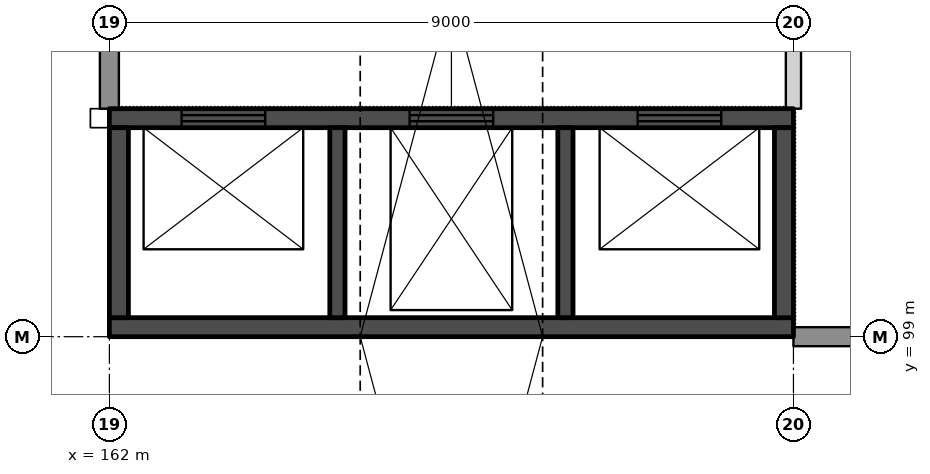
"""IFC4 building model, lengths in metres.
Left out: names, types, materials, properties, quantities, classifications, styles, units other than length and angle.
Written with IfcOpenShell. Run it as: python <this file> out.ifc"""

import sys

from ifc_helpers import new_model, si_unit, direction, frame, frame_2d, origin, place, context, subcontext, project, spatial, polyline, rectangle, outline, extrude, element, fill, save


model = new_model("IFC4")
c1 = context("Model", 3, precision=1e-05, world=origin(), true_north=direction((0.0, 1.0)))
c2 = subcontext(c1, "Body", "Model", "MODEL_VIEW")
j1 = project(units=[si_unit("LENGTHUNIT", "METRE"), si_unit("PLANEANGLEUNIT", "RADIAN")], contexts=[c1])
p1 = place(None, origin())
s1 = spatial("IfcSite", under=j1, at=p1, CompositionType="ELEMENT")
p2 = place(p1, origin())
s2 = spatial("IfcBuilding", under=s1, at=p2, CompositionType="ELEMENT")
p3 = place(p2, frame((0.0, 0.0, 33.5)))
s3 = spatial("IfcBuildingStorey", under=s2, at=p3, CompositionType="ELEMENT", Elevation=33.5)
p4 = place(p3, frame((171.0, 102.0, 0.0), z_axis=(0.0, 0.0, 1.0), x_axis=(0.0, 1.0, 0.0)))
e1 = element("IfcWall", 1, at=p4, inside=s3, PredefinedType="PARTITIONING", context=c2, shape_type="SweptSolid", body=[
    extrude(rectangle(XDim=5.65, YDim=0.2, at=frame_2d((2.825, 0.0))), origin(), (0.0, 0.0, 1.0), 4.0),
])
p5 = place(p3, frame((162.0, 101.875, 0.0), z_axis=(0.0, 0.0, 1.0), x_axis=(1.0, 0.0, 0.0)))
e2 = element("IfcWall", 2, at=p5, inside=s3, PredefinedType="SHEAR", context=c2, shape_type="SweptSolid", body=[
    extrude(rectangle(XDim=9.0, YDim=0.25, at=frame_2d((4.5, 0.0))), origin(), (0.0, 0.0, 1.0), 4.0),
])
p6 = place(p5, frame((0.95, 0.0, 0.0)))
e3 = element("IfcOpeningElement", 3, at=p6, cuts=e2, PredefinedType="OPENING", context=c2, shape_type="SweptSolid", body=[
    extrude(rectangle(XDim=1.1, YDim=2.1, at=frame_2d((0.55, 1.05))), frame((0.0, 0.135, 0.0), z_axis=(0.0, -1.0, 0.0), x_axis=(1.0, 0.0, 0.0)), (0.0, 0.0, 1.0), 0.27),
])
p7 = place(p5, frame((3.95, 0.0, 0.0)))
e4 = element("IfcOpeningElement", 4, at=p7, cuts=e2, PredefinedType="OPENING", context=c2, shape_type="SweptSolid", body=[
    extrude(rectangle(XDim=1.1, YDim=2.1, at=frame_2d((0.55, 1.05))), frame((0.0, 0.135, 0.0), z_axis=(0.0, -1.0, 0.0), x_axis=(1.0, 0.0, 0.0)), (0.0, 0.0, 1.0), 0.27),
])
p8 = place(p5, frame((6.95, 0.0, 0.0)))
e5 = element("IfcOpeningElement", 5, at=p8, cuts=e2, PredefinedType="OPENING", context=c2, shape_type="SweptSolid", body=[
    extrude(rectangle(XDim=1.1, YDim=2.1, at=frame_2d((0.55, 1.05))), frame((0.0, 0.135, 0.0), z_axis=(0.0, -1.0, 0.0), x_axis=(1.0, 0.0, 0.0)), (0.0, 0.0, 1.0), 0.27),
])
p9 = place(p3, frame((162.0, 99.125, 0.0), z_axis=(0.0, 0.0, 1.0), x_axis=(1.0, 0.0, 0.0)))
e6 = element("IfcWall", 6, at=p9, inside=s3, PredefinedType="SHEAR", context=c2, shape_type="SweptSolid", body=[
    extrude(rectangle(XDim=9.0, YDim=0.25, at=frame_2d((4.5, 0.0))), origin(), (0.0, 0.0, 1.0), 4.0),
])
for number, where, z_axis, x_axis in (
    (7, (162.125, 99.25, 0.0), (0.0, 0.0, 1.0), (0.0, 1.0, 0.0)),
    (8, (170.875, 99.25, 0.0), (0.0, 0.0, 1.0), (0.0, 1.0, 0.0)),
):
    element("IfcWall", number, at=place(p3, frame(where, z_axis=z_axis, x_axis=x_axis)), inside=s3, PredefinedType="SHEAR", context=c2, shape_type="SweptSolid", body=[
        extrude(rectangle(XDim=2.5, YDim=0.25, at=frame_2d((1.25, 0.0))), origin(), (0.0, 0.0, 1.0), 4.0),
    ])
for number, where, z_axis, x_axis in (
    (9, (165.0, 99.25, 0.0), (0.0, 0.0, 1.0), (0.0, 1.0, 0.0)),
    (10, (168.0, 99.25, 0.0), (0.0, 0.0, 1.0), (0.0, 1.0, 0.0)),
):
    element("IfcWall", number, at=place(p3, frame(where, z_axis=z_axis, x_axis=x_axis)), inside=s3, PredefinedType="SHEAR", context=c2, shape_type="SweptSolid", body=[
        extrude(rectangle(XDim=2.5, YDim=0.2, at=frame_2d((1.25, 0.0))), origin(), (0.0, 0.0, 1.0), 4.0),
    ])
p10 = place(p3, frame((162.0, 102.0, 0.0), z_axis=(0.0, 0.0, 1.0), x_axis=(0.0, 1.0, 0.0)))
e11 = element("IfcWall", 11, at=p10, inside=s3, PredefinedType="SOLIDWALL", context=c2, shape_type="SweptSolid", body=[
    extrude(rectangle(XDim=5.65, YDim=0.25, at=frame_2d((2.825, 0.0))), origin(), (0.0, 0.0, 1.0), 4.0),
])
p11 = place(p3, frame((171.0, 99.0, 0.0), z_axis=(0.0, 0.0, 1.0), x_axis=(1.0, 0.0, 0.0)))
e12 = element("IfcWall", 12, at=p11, inside=s3, PredefinedType="SOLIDWALL", context=c2, shape_type="SweptSolid", body=[
    extrude(rectangle(XDim=9.0, YDim=0.25, at=frame_2d((4.5, 0.0))), origin(), (0.0, 0.0, 1.0), 4.0),
])
p12 = place(p6, origin())
e13 = element("IfcDoor", 13, at=p12, inside=s3, OperationType="DOUBLE_DOOR_SLIDING", PredefinedType="DOOR", context=c2, shape_type="SweptSolid", body=[
    extrude(rectangle(XDim=1.1, YDim=2.1, at=frame_2d((0.55, 1.05))), frame((0.0, 0.025, 0.0), z_axis=(0.0, -1.0, 0.0), x_axis=(1.0, 0.0, 0.0)), (0.0, 0.0, 1.0), 0.05),
])
fill(e3, e13)
p13 = place(p7, origin())
e14 = element("IfcDoor", 14, at=p13, inside=s3, OperationType="DOUBLE_DOOR_SLIDING", PredefinedType="DOOR", context=c2, shape_type="SweptSolid", body=[
    extrude(rectangle(XDim=1.1, YDim=2.1, at=frame_2d((0.55, 1.05))), frame((0.0, 0.025, 0.0), z_axis=(0.0, -1.0, 0.0), x_axis=(1.0, 0.0, 0.0)), (0.0, 0.0, 1.0), 0.05),
])
fill(e4, e14)
p14 = place(p8, origin())
e15 = element("IfcDoor", 15, at=p14, inside=s3, OperationType="DOUBLE_DOOR_SLIDING", PredefinedType="DOOR", context=c2, shape_type="SweptSolid", body=[
    extrude(rectangle(XDim=1.1, YDim=2.1, at=frame_2d((0.55, 1.05))), frame((0.0, 0.025, 0.0), z_axis=(0.0, -1.0, 0.0), x_axis=(1.0, 0.0, 0.0)), (0.0, 0.0, 1.0), 0.05),
])
fill(e5, e15)
p15 = place(p2, frame((0.0, 0.0, 47.1)))
p16 = place(p15, frame((135.045, 81.01, 13.05), z_axis=(0.0, 0.072032280133, 0.99740230129), x_axis=(1.0, 0.0, 0.0)))
p17 = place(p16, origin())
e16 = element("IfcWindow", 16, at=p17, inside=s3, PartitioningType="SINGLE_PANEL", PredefinedType="SKYLIGHT", context=c2, shape_type="SweptSolid", body=[
    extrude(outline(polyline([(30.255, 9.013), (32.655, 9.013), (32.655, 18.037), (30.255, 18.037), (30.255, 9.013)])), origin(), (0.0, 0.0, -1.0), 0.05),
])
p18 = place(p16, origin())
e17 = element("IfcWindow", 17, at=p18, inside=s3, PartitioningType="SINGLE_PANEL", PredefinedType="SKYLIGHT", context=c2, shape_type="SweptSolid", body=[
    extrude(outline(polyline([(30.255, 18.037), (32.655, 18.037), (32.655, 27.06), (30.255, 27.06), (30.255, 18.037)])), origin(), (0.0, 0.0, -1.0), 0.05),
])
save(model, sys.argv[1])
